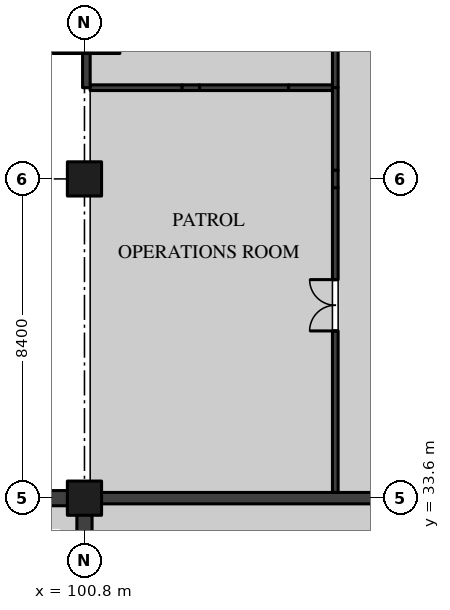
"""IFC4 building model, lengths in metres.
Left out: names, types, materials, properties, quantities, classifications, styles, units other than length and angle.
Written with IfcOpenShell. Run it as: python <this file> out.ifc"""

import sys

from ifc_helpers import new_model, si_unit, direction, frame, frame_2d, origin, origin_2d, place, context, subcontext, project, spatial, polyline, rectangle, outline, extrude, element, fill, save


model = new_model("IFC4")
c1 = context("Model", 3, precision=1e-05, world=origin(), true_north=direction((0.0, 1.0)))
c2 = subcontext(c1, "Body", "Model", "MODEL_VIEW")
j1 = project(units=[si_unit("LENGTHUNIT", "METRE"), si_unit("PLANEANGLEUNIT", "RADIAN")], contexts=[c1])
p1 = place(None, origin())
s1 = spatial("IfcSite", under=j1, at=p1, CompositionType="ELEMENT")
p2 = place(p1, origin())
s2 = spatial("IfcBuilding", under=s1, at=p2, CompositionType="ELEMENT")
p3 = place(p2, frame((0.0, 0.0, 5.4)))
s3 = spatial("IfcBuildingStorey", under=s2, at=p3, CompositionType="ELEMENT", Elevation=5.4)
p4 = place(p3, frame((100.8, 33.6, 3.0), z_axis=(0.0, 0.0, 1.0), x_axis=(1.0, 0.0, 0.0)))
e1 = element("IfcColumn", 1, at=p4, inside=s3, PredefinedType="COLUMN", context=c2, shape_type="SweptSolid", body=[
    extrude(rectangle(XDim=0.9, YDim=0.9, at=origin_2d()), origin(), (0.0, 0.0, 1.0), 1.37),
])
p5 = place(p3, frame((100.8, 42.0, 0.0), z_axis=(0.0, 0.0, 1.0), x_axis=(1.0, 0.0, 0.0)))
e2 = element("IfcColumn", 2, at=p5, inside=s3, PredefinedType="COLUMN", context=c2, shape_type="SweptSolid", body=[
    extrude(rectangle(XDim=0.9, YDim=0.9, at=origin_2d()), origin(), (0.0, 0.0, 1.0), 4.37),
])
p6 = place(p3, frame((92.2, 33.6, 0.0), z_axis=(0.0, 0.0, 1.0), x_axis=(1.0, 0.0, 0.0)))
e3 = element("IfcWall", 3, at=p6, inside=s3, PredefinedType="SHEAR", context=c2, shape_type="SweptSolid", body=[
    extrude(rectangle(XDim=8.8, YDim=0.4, at=frame_2d((4.4, 0.0))), origin(), (0.0, 0.0, 1.0), 3.0),
])
p7 = place(p3, frame((100.8, 25.4, 0.0), z_axis=(0.0, 0.0, 1.0), x_axis=(0.0, 1.0, 0.0)))
e4 = element("IfcWall", 4, at=p7, inside=s3, PredefinedType="SHEAR", context=c2, shape_type="SweptSolid", body=[
    extrude(rectangle(XDim=8.0, YDim=0.4, at=frame_2d((4.0, 0.0))), origin(), (0.0, 0.0, 1.0), 3.0),
])
p8 = place(p3, frame((107.4, 44.4, 0.0), z_axis=(0.0, 0.0, 1.0), x_axis=(0.0, 1.0, 0.0)))
e5 = element("IfcWall", 5, at=p8, inside=s3, PredefinedType="PARTITIONING", context=c2, shape_type="SweptSolid", body=[
    extrude(rectangle(XDim=3.6, YDim=0.15, at=frame_2d((1.8, 0.0))), origin(), (0.0, 0.0, 1.0), 4.37),
])
p9 = place(p8, frame((1.05, 0.0, 0.0)))
e6 = element("IfcOpeningElement", 6, at=p9, cuts=e5, PredefinedType="OPENING", context=c2, shape_type="SweptSolid", body=[
    extrude(rectangle(XDim=1.5, YDim=2.1, at=frame_2d((0.75, 1.05))), frame((0.0, 0.085, 0.0), z_axis=(0.0, -1.0, 0.0), x_axis=(1.0, 0.0, 0.0)), (0.0, 0.0, 1.0), 0.17),
])
p10 = place(p3, frame((100.95, 44.4, 0.0), z_axis=(0.0, 0.0, 1.0), x_axis=(1.0, 0.0, 0.0)))
e7 = element("IfcWall", 7, at=p10, inside=s3, PredefinedType="PARTITIONING", context=c2, shape_type="SweptSolid", body=[
    extrude(rectangle(XDim=2.42, YDim=0.15, at=frame_2d((1.21, 0.0))), origin(), (0.0, 0.0, 1.0), 4.37),
])
p11 = place(p3, frame((103.37, 44.4, 0.0), z_axis=(0.0, 0.0, 1.0), x_axis=(1.0, 0.0, 0.0)))
e8 = element("IfcWall", 8, at=p11, inside=s3, PredefinedType="PARTITIONING", context=c2, shape_type="SweptSolid", body=[
    extrude(rectangle(XDim=0.46, YDim=0.15, at=frame_2d((0.23, 0.0))), origin(), (0.0, 0.0, 1.0), 3.895),
])
p12 = place(p3, frame((103.83, 44.4, 0.0), z_axis=(0.0, 0.0, 1.0), x_axis=(1.0, 0.0, 0.0)))
e9 = element("IfcWall", 9, at=p12, inside=s3, PredefinedType="PARTITIONING", context=c2, shape_type="SweptSolid", body=[
    extrude(rectangle(XDim=2.34, YDim=0.15, at=frame_2d((1.17, 0.0))), origin(), (0.0, 0.0, 1.0), 4.37),
])
p13 = place(p3, frame((106.17, 44.4, 0.0), z_axis=(0.0, 0.0, 1.0), x_axis=(1.0, 0.0, 0.0)))
e10 = element("IfcWall", 10, at=p13, inside=s3, PredefinedType="PARTITIONING", context=c2, shape_type="SweptSolid", body=[
    extrude(rectangle(XDim=1.155, YDim=0.15, at=frame_2d((0.578, 0.0))), origin(), (0.0, 0.0, 1.0), 3.895),
])
p14 = place(p3, frame((107.4, 33.75, 0.0), z_axis=(0.0, 0.0, 1.0), x_axis=(0.0, 1.0, 0.0)))
e11 = element("IfcWall", 11, at=p14, inside=s3, PredefinedType="PARTITIONING", context=c2, shape_type="SweptSolid", body=[
    extrude(rectangle(XDim=8.02, YDim=0.15, at=frame_2d((4.01, 0.0))), origin(), (0.0, 0.0, 1.0), 4.37),
])
p15 = place(p14, frame((4.25, 0.0, 0.0)))
e12 = element("IfcOpeningElement", 12, at=p15, cuts=e11, PredefinedType="OPENING", context=c2, shape_type="SweptSolid", body=[
    extrude(rectangle(XDim=1.35, YDim=2.1, at=frame_2d((0.675, 1.05))), frame((0.0, 0.085, 0.0), z_axis=(0.0, -1.0, 0.0), x_axis=(1.0, 0.0, 0.0)), (0.0, 0.0, 1.0), 0.17),
])
p16 = place(p3, frame((107.4, 41.77, 0.0), z_axis=(0.0, 0.0, 1.0), x_axis=(0.0, 1.0, 0.0)))
e13 = element("IfcWall", 13, at=p16, inside=s3, PredefinedType="PARTITIONING", context=c2, shape_type="SweptSolid", body=[
    extrude(rectangle(XDim=0.46, YDim=0.15, at=frame_2d((0.23, 0.0))), origin(), (0.0, 0.0, 1.0), 3.746),
])
p17 = place(p3, frame((107.4, 42.23, 0.0), z_axis=(0.0, 0.0, 1.0), x_axis=(0.0, 1.0, 0.0)))
e14 = element("IfcWall", 14, at=p17, inside=s3, PredefinedType="PARTITIONING", context=c2, shape_type="SweptSolid", body=[
    extrude(rectangle(XDim=2.17, YDim=0.15, at=frame_2d((1.085, 0.0))), origin(), (0.0, 0.0, 1.0), 4.37),
])
p18 = place(p3, frame((100.85, 48.0, 0.0), z_axis=(0.0, 0.0, 1.0), x_axis=(0.0, -1.0, 0.0)))
e15 = element("IfcWall", 15, at=p18, inside=s3, PredefinedType="SOLIDWALL", context=c2, shape_type="SweptSolid", body=[
    extrude(rectangle(XDim=3.6, YDim=0.2, at=frame_2d((1.8, 0.0))), origin(), (0.0, 0.0, 1.0), 3.746),
])
p19 = place(p18, frame((0.9, 0.0, 0.0)))
e16 = element("IfcOpeningElement", 16, at=p19, cuts=e15, PredefinedType="OPENING", context=c2, shape_type="SweptSolid", body=[
    extrude(rectangle(XDim=1.8, YDim=2.4, at=frame_2d((0.9, 1.2))), frame((0.0, 0.11, 0.0), z_axis=(0.0, -1.0, 0.0), x_axis=(1.0, 0.0, 0.0)), (0.0, 0.0, 1.0), 0.22),
])
p20 = place(p3, frame((109.122, 33.6, 0.0), z_axis=(0.0, 0.0, 1.0), x_axis=(-1.0, 0.0, 0.0)))
e17 = element("IfcWall", 17, at=p20, inside=s3, PredefinedType="SOLIDWALL", context=c2, shape_type="SweptSolid", body=[
    extrude(outline(polyline([(0.0, 0.0), (8.122, 0.0), (8.122, 3.6), (7.872, 3.6), (0.122, 3.6), (0.0, 3.6), (0.0, 0.0)])), frame((0.0, 0.15, 0.0), z_axis=(0.0, -1.0, 0.0), x_axis=(1.0, 0.0, 0.0)), (0.0, 0.0, 1.0), 0.3),
])
p21 = place(p15, origin())
e18 = element("IfcDoor", 18, at=p21, inside=s3, OperationType="DOUBLE_DOOR_SINGLE_SWING", PredefinedType="DOOR", context=c2, shape_type="SweptSolid", body=[
    extrude(rectangle(XDim=1.35, YDim=2.1, at=frame_2d((0.675, 1.05))), frame((0.0, 0.025, 0.0), z_axis=(0.0, -1.0, 0.0), x_axis=(1.0, 0.0, 0.0)), (0.0, 0.0, 1.0), 0.05),
])
fill(e12, e18)
p22 = place(p19, frame((1.8, 0.0, 0.0), z_axis=(0.0, 0.0, 1.0), x_axis=(-1.0, 0.0, 0.0)))
e19 = element("IfcDoor", 19, at=p22, inside=s3, OperationType="DOUBLE_DOOR_DOUBLE_SWING", PredefinedType="DOOR", context=c2, shape_type="SweptSolid", body=[
    extrude(rectangle(XDim=1.8, YDim=2.4, at=frame_2d((0.9, 1.2))), frame((0.0, 0.025, 0.0), z_axis=(0.0, -1.0, 0.0), x_axis=(1.0, 0.0, 0.0)), (0.0, 0.0, 1.0), 0.05),
])
fill(e16, e19)
save(model, sys.argv[1])
